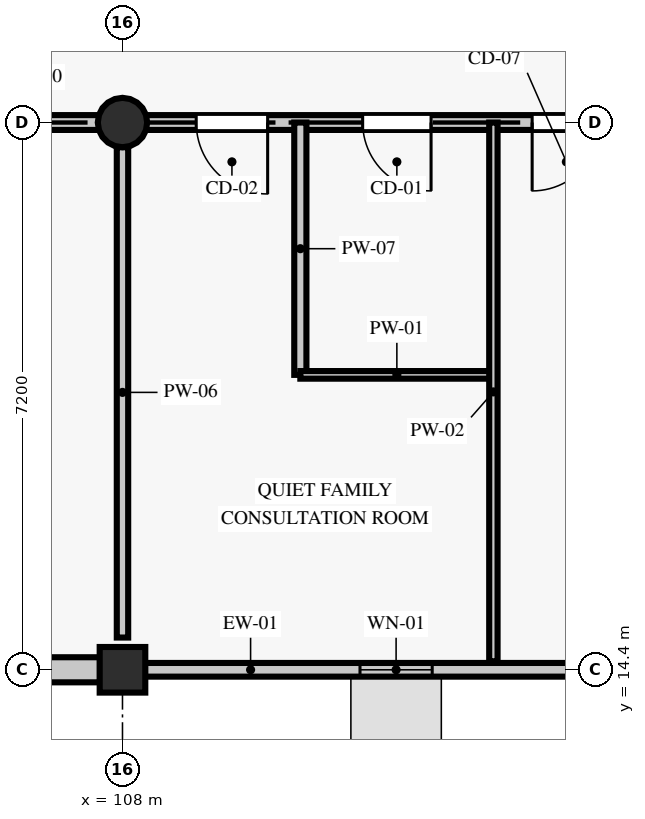
"""IFC4 building model, lengths in metres.
Left out: names, types, materials, properties, quantities, classifications, styles, units other than length and angle.
Written with IfcOpenShell. Run it as: python <this file> out.ifc"""

import sys

from ifc_helpers import new_model, si_unit, direction, frame, frame_2d, origin, origin_2d, place, context, subcontext, project, spatial, rectangle, circle, extrude, element, fill, save


model = new_model("IFC4")
c1 = context("Model", 3, precision=1e-05, world=origin(), true_north=direction((0.0, 1.0)))
c2 = subcontext(c1, "Body", "Model", "MODEL_VIEW")
j1 = project(units=[si_unit("LENGTHUNIT", "METRE"), si_unit("PLANEANGLEUNIT", "RADIAN")], contexts=[c1])
p1 = place(None, origin())
s1 = spatial("IfcSite", under=j1, at=p1, CompositionType="ELEMENT")
p2 = place(p1, origin())
s2 = spatial("IfcBuilding", under=s1, at=p2, CompositionType="ELEMENT")
p3 = place(p2, frame((0.0, 0.0, 9.6)))
s3 = spatial("IfcBuildingStorey", under=s2, at=p3, CompositionType="ELEMENT", Elevation=9.6)
p4 = place(p3, frame((108.0, 14.4, 0.0), z_axis=(0.0, 0.0, 1.0), x_axis=(1.0, 0.0, 0.0)))
e1 = element("IfcColumn", 1, at=p4, inside=s3, PredefinedType="COLUMN", context=c2, shape_type="SweptSolid", body=[
    extrude(rectangle(XDim=0.6, YDim=0.6, at=origin_2d()), origin(), (0.0, 0.0, 1.0), 3.885),
])
p5 = place(p3, frame((108.0, 21.6, 0.0), z_axis=(0.0, 0.0, 1.0), x_axis=(1.0, 0.0, 0.0)))
e2 = element("IfcColumn", 2, at=p5, inside=s3, PredefinedType="COLUMN", context=c2, shape_type="SweptSolid", body=[
    extrude(circle(Radius=0.325, at=origin_2d()), origin(), (0.0, 0.0, 1.0), 3.885),
])
p6 = place(p3, frame((101.096, 14.4, 0.0), z_axis=(0.0, 0.0, 1.0), x_axis=(1.0, 0.0, 0.0)))
e3 = element("IfcWall", 3, at=p6, inside=s3, PredefinedType="STANDARD", context=c2, shape_type="SweptSolid", body=[
    extrude(rectangle(XDim=6.608, YDim=0.33, at=frame_2d((3.304, 0.0))), origin(), (0.0, 0.0, 1.0), 3.235),
])
p7 = place(p6, frame((2.629, 0.0, 0.9)))
e4 = element("IfcOpeningElement", 4, at=p7, cuts=e3, PredefinedType="OPENING", context=c2, shape_type="SweptSolid", body=[
    extrude(rectangle(XDim=2.25, YDim=1.78, at=frame_2d((1.125, 0.89))), frame((0.0, 0.175, 0.0), z_axis=(0.0, -1.0, 0.0), x_axis=(1.0, 0.0, 0.0)), (0.0, 0.0, 1.0), 0.35),
])
p8 = place(p3, frame((108.296, 14.4, 0.0), z_axis=(0.0, 0.0, 1.0), x_axis=(1.0, 0.0, 0.0)))
e5 = element("IfcWall", 5, at=p8, inside=s3, PredefinedType="STANDARD", context=c2, shape_type="SweptSolid", body=[
    extrude(rectangle(XDim=6.608, YDim=0.18, at=frame_2d((3.304, 0.0))), origin(), (0.0, 0.0, 1.0), 3.235),
])
p9 = place(p8, frame((2.829, 0.0, 0.9)))
e6 = element("IfcOpeningElement", 6, at=p9, cuts=e5, PredefinedType="OPENING", context=c2, shape_type="SweptSolid", body=[
    extrude(rectangle(XDim=0.95, YDim=1.3, at=frame_2d((0.475, 0.65))), frame((0.0, 0.1, 0.0), z_axis=(0.0, -1.0, 0.0), x_axis=(1.0, 0.0, 0.0)), (0.0, 0.0, 1.0), 0.2),
])
p10 = place(p3, frame((94.024, 21.6, 0.0), z_axis=(0.0, 0.0, 1.0), x_axis=(1.0, 0.0, 0.0)))
e7 = element("IfcWall", 7, at=p10, inside=s3, PredefinedType="PARTITIONING", context=c2, shape_type="SweptSolid", body=[
    extrude(rectangle(XDim=27.951, YDim=0.195, at=frame_2d((13.976, 0.0))), origin(), (0.0, 0.0, 1.0), 3.185),
])
p11 = place(p10, frame((2.632, 0.0, 0.0)))
e8 = element("IfcOpeningElement", 8, at=p11, cuts=e7, PredefinedType="OPENING", context=c2, shape_type="SweptSolid", body=[
    extrude(rectangle(XDim=0.9, YDim=2.08, at=frame_2d((0.45, 1.04))), frame((0.0, 0.107, 0.0), z_axis=(0.0, -1.0, 0.0), x_axis=(1.0, 0.0, 0.0)), (0.0, 0.0, 1.0), 0.215),
])
p12 = place(p10, frame((7.65, 0.0, 0.0)))
e9 = element("IfcOpeningElement", 9, at=p12, cuts=e7, PredefinedType="OPENING", context=c2, shape_type="SweptSolid", body=[
    extrude(rectangle(XDim=0.94, YDim=2.08, at=frame_2d((0.47, 1.04))), frame((0.0, 0.107, 0.0), z_axis=(0.0, -1.0, 0.0), x_axis=(1.0, 0.0, 0.0)), (0.0, 0.0, 1.0), 0.215),
])
p13 = place(p10, frame((9.727, 0.0, 0.0)))
e10 = element("IfcOpeningElement", 10, at=p13, cuts=e7, PredefinedType="OPENING", context=c2, shape_type="SweptSolid", body=[
    extrude(rectangle(XDim=0.98, YDim=2.08, at=frame_2d((0.49, 1.04))), frame((0.0, 0.107, 0.0), z_axis=(0.0, -1.0, 0.0), x_axis=(1.0, 0.0, 0.0)), (0.0, 0.0, 1.0), 0.215),
])
p14 = place(p10, frame((14.946, 0.0, 0.0)))
e11 = element("IfcOpeningElement", 11, at=p14, cuts=e7, PredefinedType="OPENING", context=c2, shape_type="SweptSolid", body=[
    extrude(rectangle(XDim=0.94, YDim=2.08, at=frame_2d((0.47, 1.04))), frame((0.0, 0.107, 0.0), z_axis=(0.0, -1.0, 0.0), x_axis=(1.0, 0.0, 0.0)), (0.0, 0.0, 1.0), 0.215),
])
p15 = place(p10, frame((17.136, 0.0, 0.0)))
e12 = element("IfcOpeningElement", 12, at=p15, cuts=e7, PredefinedType="OPENING", context=c2, shape_type="SweptSolid", body=[
    extrude(rectangle(XDim=0.9, YDim=2.08, at=frame_2d((0.45, 1.04))), frame((0.0, 0.107, 0.0), z_axis=(0.0, -1.0, 0.0), x_axis=(1.0, 0.0, 0.0)), (0.0, 0.0, 1.0), 0.215),
])
p16 = place(p10, frame((19.366, 0.0, 0.0)))
e13 = element("IfcOpeningElement", 13, at=p16, cuts=e7, PredefinedType="OPENING", context=c2, shape_type="SweptSolid", body=[
    extrude(rectangle(XDim=0.9, YDim=2.13, at=frame_2d((0.45, 1.065))), frame((0.0, 0.107, 0.0), z_axis=(0.0, -1.0, 0.0), x_axis=(1.0, 0.0, 0.0)), (0.0, 0.0, 1.0), 0.215),
])
p17 = place(p10, frame((24.284, 0.0, 0.0)))
e14 = element("IfcOpeningElement", 14, at=p17, cuts=e7, PredefinedType="OPENING", context=c2, shape_type="SweptSolid", body=[
    extrude(rectangle(XDim=0.9, YDim=2.13, at=frame_2d((0.45, 1.065))), frame((0.0, 0.107, 0.0), z_axis=(0.0, -1.0, 0.0), x_axis=(1.0, 0.0, 0.0)), (0.0, 0.0, 1.0), 0.215),
])
p18 = place(p3, frame((108.0, 14.824, 0.0), z_axis=(0.0, 0.0, 1.0), x_axis=(0.0, 1.0, 0.0)))
e15 = element("IfcWall", 15, at=p18, inside=s3, PredefinedType="PARTITIONING", context=c2, shape_type="SweptSolid", body=[
    extrude(rectangle(XDim=6.451, YDim=0.15, at=frame_2d((3.225, 0.0))), origin(), (0.0, 0.0, 1.0), 3.335),
])
p19 = place(p3, frame((110.34, 18.28, 0.0), z_axis=(0.0, 0.0, 1.0), x_axis=(0.0, 1.0, 0.0)))
e16 = element("IfcWall", 16, at=p19, inside=s3, PredefinedType="PARTITIONING", context=c2, shape_type="SweptSolid", body=[
    extrude(rectangle(XDim=3.32, YDim=0.16, at=frame_2d((1.66, 0.0))), origin(), (0.0, 0.0, 1.0), 3.185),
])
p20 = place(p3, frame((110.34, 18.28, 0.0), z_axis=(0.0, 0.0, 1.0), x_axis=(1.0, 0.0, 0.0)))
e17 = element("IfcWall", 17, at=p20, inside=s3, PredefinedType="PARTITIONING", context=c2, shape_type="SweptSolid", body=[
    extrude(rectangle(XDim=2.54, YDim=0.1, at=frame_2d((1.27, 0.0))), origin(), (0.0, 0.0, 1.0), 3.885),
])
p21 = place(p3, frame((112.88, 14.512, 0.0), z_axis=(0.0, 0.0, 1.0), x_axis=(0.0, 1.0, 0.0)))
e18 = element("IfcWall", 18, at=p21, inside=s3, PredefinedType="PARTITIONING", context=c2, shape_type="SweptSolid", body=[
    extrude(rectangle(XDim=7.088, YDim=0.11, at=frame_2d((3.544, 0.0))), origin(), (0.0, 0.0, 1.0), 3.185),
])
p22 = place(p9, origin())
e19 = element("IfcWindow", 19, at=p22, inside=s3, PartitioningType="SINGLE_PANEL", PredefinedType="WINDOW", context=c2, shape_type="SweptSolid", body=[
    extrude(rectangle(XDim=0.95, YDim=1.3, at=frame_2d((0.475, 0.65))), frame((0.0, 0.03, 0.0), z_axis=(0.0, -1.0, 0.0), x_axis=(1.0, 0.0, 0.0)), (0.0, 0.0, 1.0), 0.06),
])
fill(e6, e19)
p23 = place(p14, frame((0.94, 0.0, 0.0), z_axis=(0.0, 0.0, 1.0), x_axis=(-1.0, 0.0, 0.0)))
e20 = element("IfcDoor", 20, at=p23, inside=s3, OperationType="SINGLE_SWING_LEFT", PredefinedType="DOOR", context=c2, shape_type="SweptSolid", body=[
    extrude(rectangle(XDim=0.94, YDim=2.08, at=frame_2d((0.47, 1.04))), frame((0.0, 0.025, 0.0), z_axis=(0.0, -1.0, 0.0), x_axis=(1.0, 0.0, 0.0)), (0.0, 0.0, 1.0), 0.05),
])
fill(e11, e20)
p24 = place(p15, frame((0.9, 0.0, 0.0), z_axis=(0.0, 0.0, 1.0), x_axis=(-1.0, 0.0, 0.0)))
e21 = element("IfcDoor", 21, at=p24, inside=s3, OperationType="SINGLE_SWING_LEFT", PredefinedType="DOOR", context=c2, shape_type="SweptSolid", body=[
    extrude(rectangle(XDim=0.9, YDim=2.08, at=frame_2d((0.45, 1.04))), frame((0.0, 0.025, 0.0), z_axis=(0.0, -1.0, 0.0), x_axis=(1.0, 0.0, 0.0)), (0.0, 0.0, 1.0), 0.05),
])
fill(e12, e21)
p25 = place(p16, frame((0.9, 0.0, 0.0), z_axis=(0.0, 0.0, 1.0), x_axis=(-1.0, 0.0, 0.0)))
e22 = element("IfcDoor", 22, at=p25, inside=s3, OperationType="SINGLE_SWING_RIGHT", PredefinedType="DOOR", context=c2, shape_type="SweptSolid", body=[
    extrude(rectangle(XDim=0.9, YDim=2.13, at=frame_2d((0.45, 1.065))), frame((0.0, 0.025, 0.0), z_axis=(0.0, -1.0, 0.0), x_axis=(1.0, 0.0, 0.0)), (0.0, 0.0, 1.0), 0.05),
])
fill(e13, e22)
save(model, sys.argv[1])
